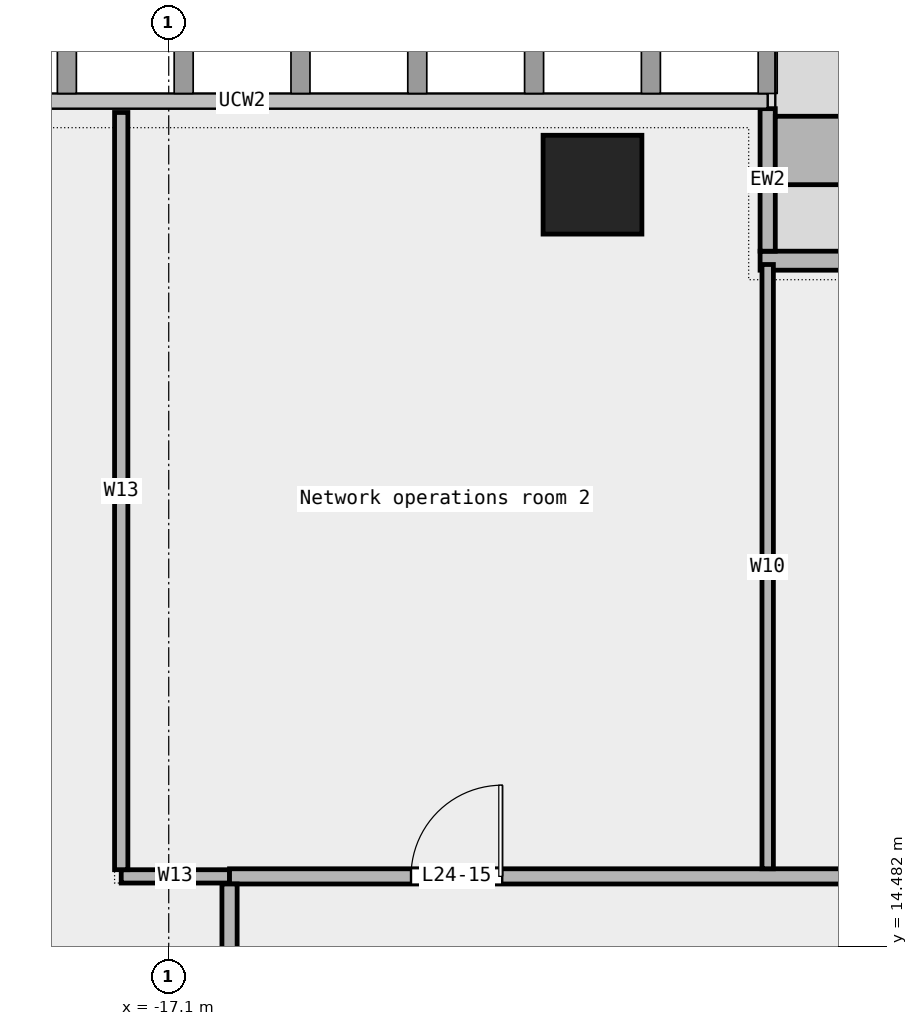
"""IFC4 building model, lengths in metres.
Left out: names, types, materials, properties, quantities, classifications, styles, units other than length and angle.
Written with IfcOpenShell. Run it as: python <this file> out.ifc"""

import sys

from ifc_helpers import new_model, si_unit, direction, frame, frame_2d, origin, origin_2d, place, context, subcontext, project, spatial, rectangle, extrude, element, fill, save


model = new_model("IFC4")
c1 = context("Model", 3, precision=1e-05, world=origin(), true_north=direction((0.0, 1.0)))
c2 = subcontext(c1, "Body", "Model", "MODEL_VIEW")
j1 = project(units=[si_unit("LENGTHUNIT", "METRE"), si_unit("PLANEANGLEUNIT", "RADIAN")], contexts=[c1])
p1 = place(None, origin())
s1 = spatial("IfcSite", under=j1, at=p1, CompositionType="ELEMENT")
p2 = place(p1, origin())
s2 = spatial("IfcBuilding", under=s1, at=p2, CompositionType="ELEMENT")
p3 = place(p2, frame((0.0, 0.0, 121.6)))
s3 = spatial("IfcBuildingStorey", under=s2, at=p3, CompositionType="ELEMENT", Elevation=121.6)
p4 = place(p3, frame((-11.525, 24.5, 0.0), z_axis=(0.0, 0.0, 1.0), x_axis=(1.0, 0.0, 0.0)))
e1 = element("IfcColumn", 1, at=p4, inside=s3, PredefinedType="COLUMN", context=c2, shape_type="SweptSolid", body=[
    extrude(rectangle(XDim=1.3, YDim=1.3, at=origin_2d()), origin(), (0.0, 0.0, 1.0), 4.05),
])
p5 = place(p3, frame((4.71, 23.5, 0.0), z_axis=(0.0, 0.0, 1.0), x_axis=(-1.0, 0.0, 0.0)))
e2 = element("IfcWall", 2, at=p5, inside=s3, PredefinedType="STANDARD", context=c2, shape_type="SweptSolid", body=[
    extrude(rectangle(XDim=14.03, YDim=0.25, at=frame_2d((7.015, 0.0))), origin(), (0.0, 0.0, 1.0), 4.05),
])
p6 = place(p5, frame((1.75, 0.0, 0.45)))
e3 = element("IfcOpeningElement", 3, at=p6, cuts=e2, PredefinedType="OPENING", context=c2, shape_type="SweptSolid", body=[
    extrude(rectangle(XDim=1.5, YDim=3.0, at=frame_2d((0.75, 1.5))), frame((0.0, 0.137, 0.0), z_axis=(0.0, -1.0, 0.0), x_axis=(1.0, 0.0, 0.0)), (0.0, 0.0, 1.0), 0.274),
])
p7 = place(p5, frame((6.0, 0.0, 0.0)))
e4 = element("IfcOpeningElement", 4, at=p7, cuts=e2, PredefinedType="OPENING", context=c2, shape_type="SweptSolid", body=[
    extrude(rectangle(XDim=1.8, YDim=2.4, at=frame_2d((0.9, 1.2))), frame((0.0, 0.137, 0.0), z_axis=(0.0, -1.0, 0.0), x_axis=(1.0, 0.0, 0.0)), (0.0, 0.0, 1.0), 0.274),
])
p8 = place(p5, frame((10.75, 0.0, 0.45)))
e5 = element("IfcOpeningElement", 5, at=p8, cuts=e2, PredefinedType="OPENING", context=c2, shape_type="SweptSolid", body=[
    extrude(rectangle(XDim=1.5, YDim=3.0, at=frame_2d((0.75, 1.5))), frame((0.0, 0.137, 0.0), z_axis=(0.0, -1.0, 0.0), x_axis=(1.0, 0.0, 0.0)), (0.0, 0.0, 1.0), 0.274),
])
p9 = place(p3, frame((-9.22, 25.5, 0.0), z_axis=(0.0, 0.0, 1.0), x_axis=(0.0, -1.0, 0.0)))
e6 = element("IfcWall", 6, at=p9, inside=s3, PredefinedType="STANDARD", context=c2, shape_type="SweptSolid", body=[
    extrude(rectangle(XDim=1.875, YDim=0.2, at=frame_2d((0.938, 0.0))), origin(), (0.0, 0.0, 1.0), 4.05),
])
p10 = place(p3, frame((-5.52, 24.95, 0.0), z_axis=(0.0, 0.0, 1.0), x_axis=(-1.0, 0.0, 0.0)))
e7 = element("IfcWall", 7, at=p10, inside=s3, PredefinedType="STANDARD", context=c2, shape_type="SweptSolid", body=[
    extrude(rectangle(XDim=3.6, YDim=0.9, at=frame_2d((1.8, 0.0))), origin(), (0.0, 0.0, 1.0), 0.7),
])
p11 = place(p3, frame((-17.725, 15.4, 0.0), z_axis=(0.0, 0.0, 1.0), x_axis=(1.0, 0.0, 0.0)))
e8 = element("IfcWall", 8, at=p11, inside=s3, PredefinedType="PARTITIONING", context=c2, shape_type="SweptSolid", body=[
    extrude(rectangle(XDim=1.425, YDim=0.175, at=frame_2d((0.712, 0.0))), origin(), (0.0, 0.0, 1.0), 4.05),
])
p12 = place(p3, frame((-16.3, 15.4, 0.0), z_axis=(0.0, 0.0, 1.0), x_axis=(1.0, 0.0, 0.0)))
e9 = element("IfcWall", 9, at=p12, inside=s3, PredefinedType="PARTITIONING", context=c2, shape_type="SweptSolid", body=[
    extrude(rectangle(XDim=20.91, YDim=0.2, at=frame_2d((10.455, 0.0))), origin(), (0.0, 0.0, 1.0), 4.05),
])
p13 = place(p12, frame((13.245, 0.0, 0.0)))
e10 = element("IfcOpeningElement", 10, at=p13, cuts=e9, PredefinedType="OPENING", context=c2, shape_type="SweptSolid", body=[
    extrude(rectangle(XDim=1.5, YDim=2.1, at=frame_2d((0.75, 1.05))), frame((0.0, 0.112, 0.0), z_axis=(0.0, -1.0, 0.0), x_axis=(1.0, 0.0, 0.0)), (0.0, 0.0, 1.0), 0.224),
])
p14 = place(p12, frame((2.387, 0.0, 0.0)))
e11 = element("IfcOpeningElement", 11, at=p14, cuts=e9, PredefinedType="OPENING", context=c2, shape_type="SweptSolid", body=[
    extrude(rectangle(XDim=1.2, YDim=2.1, at=frame_2d((0.6, 1.05))), frame((0.0, 0.112, 0.0), z_axis=(0.0, -1.0, 0.0), x_axis=(1.0, 0.0, 0.0)), (0.0, 0.0, 1.0), 0.224),
])
p15 = place(p3, frame((-17.725, 15.488, 0.0), z_axis=(0.0, 0.0, 1.0), x_axis=(0.0, 1.0, 0.0)))
e12 = element("IfcWall", 12, at=p15, inside=s3, PredefinedType="PARTITIONING", context=c2, shape_type="SweptSolid", body=[
    extrude(rectangle(XDim=9.962, YDim=0.175, at=frame_2d((4.981, 0.0))), origin(), (0.0, 0.0, 1.0), 4.05),
])
p16 = place(p3, frame((-16.3, 11.75, 0.0), z_axis=(0.0, 0.0, 1.0), x_axis=(0.0, 1.0, 0.0)))
e13 = element("IfcWall", 13, at=p16, inside=s3, PredefinedType="PARTITIONING", context=c2, shape_type="SweptSolid", body=[
    extrude(rectangle(XDim=3.55, YDim=0.2, at=frame_2d((1.775, 0.0))), origin(), (0.0, 0.0, 1.0), 4.05),
])
p17 = place(p3, frame((-9.22, 15.5, 0.0), z_axis=(0.0, 0.0, 1.0), x_axis=(0.0, 1.0, 0.0)))
e14 = element("IfcWall", 14, at=p17, inside=s3, PredefinedType="PARTITIONING", context=c2, shape_type="SweptSolid", body=[
    extrude(rectangle(XDim=7.95, YDim=0.15, at=frame_2d((3.975, 0.0))), origin(), (0.0, 0.0, 1.0), 4.05),
])
p18 = place(p14, origin())
e15 = element("IfcDoor", 15, at=p18, inside=s3, OperationType="SINGLE_SWING_RIGHT", PredefinedType="DOOR", context=c2, shape_type="SweptSolid", body=[
    extrude(rectangle(XDim=1.2, YDim=2.1, at=frame_2d((0.6, 1.05))), frame((0.0, 0.025, 0.0), z_axis=(0.0, -1.0, 0.0), x_axis=(1.0, 0.0, 0.0)), (0.0, 0.0, 1.0), 0.05),
])
fill(e11, e15)
save(model, sys.argv[1])
